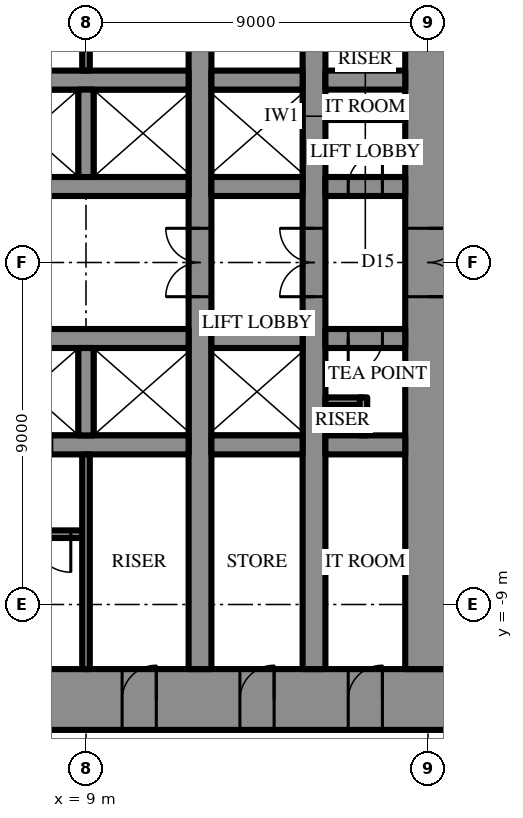
"""IFC4 building model, lengths in metres.
Left out: names, types, materials, properties, quantities, classifications, styles, units other than length and angle.
Written with IfcOpenShell. Run it as: python <this file> out.ifc"""

import sys

from ifc_helpers import new_model, si_unit, direction, frame, frame_2d, origin, place, context, subcontext, project, spatial, rectangle, extrude, element, fill, save


model = new_model("IFC4")
c1 = context("Model", 3, precision=1e-05, world=origin(), true_north=direction((0.0, 1.0)))
c2 = subcontext(c1, "Body", "Model", "MODEL_VIEW")
j1 = project(units=[si_unit("LENGTHUNIT", "METRE"), si_unit("PLANEANGLEUNIT", "RADIAN")], contexts=[c1])
p1 = place(None, origin())
s1 = spatial("IfcSite", under=j1, at=p1, CompositionType="ELEMENT")
p2 = place(p1, origin())
s2 = spatial("IfcBuilding", under=s1, at=p2, CompositionType="ELEMENT")
p3 = place(p2, frame((0.0, 0.0, 119.5)))
s3 = spatial("IfcBuildingStorey", under=s2, at=p3, CompositionType="ELEMENT", Elevation=119.5)
p4 = place(p3, frame((18.6, -11.5, 0.0), z_axis=(0.0, 0.0, 1.0), x_axis=(-1.0, 0.0, 0.0)))
e1 = element("IfcWall", 1, at=p4, inside=s3, PredefinedType="SHEAR", context=c2, shape_type="SweptSolid", body=[
    extrude(rectangle(XDim=37.2, YDim=1.6, at=frame_2d((18.6, 0.0))), origin(), (0.0, 0.0, 1.0), 4.2),
])
p5 = place(p4, frame((19.45, 0.0, 0.0)))
e2 = element("IfcOpeningElement", 2, at=p5, cuts=e1, PredefinedType="OPENING", context=c2, shape_type="SweptSolid", body=[
    extrude(rectangle(XDim=0.9, YDim=2.2, at=frame_2d((0.45, 1.1))), frame((0.0, 0.81, 0.0), z_axis=(0.0, -1.0, 0.0), x_axis=(1.0, 0.0, 0.0)), (0.0, 0.0, 1.0), 1.62),
])
p6 = place(p4, frame((22.45, 0.0, 0.0)))
e3 = element("IfcOpeningElement", 3, at=p6, cuts=e1, PredefinedType="OPENING", context=c2, shape_type="SweptSolid", body=[
    extrude(rectangle(XDim=0.9, YDim=2.2, at=frame_2d((0.45, 1.1))), frame((0.0, 0.81, 0.0), z_axis=(0.0, -1.0, 0.0), x_axis=(1.0, 0.0, 0.0)), (0.0, 0.0, 1.0), 1.62),
])
p7 = place(p4, frame((25.5, 0.0, 0.0)))
e4 = element("IfcOpeningElement", 4, at=p7, cuts=e1, PredefinedType="OPENING", context=c2, shape_type="SweptSolid", body=[
    extrude(rectangle(XDim=1.0, YDim=2.2, at=frame_2d((0.5, 1.1))), frame((0.0, 0.81, 0.0), z_axis=(0.0, -1.0, 0.0), x_axis=(1.0, 0.0, 0.0)), (0.0, 0.0, 1.0), 1.62),
])
p8 = place(p4, frame((1.8, 0.0, 0.0)))
e5 = element("IfcOpeningElement", 5, at=p8, cuts=e1, PredefinedType="OPENING", context=c2, shape_type="SweptSolid", body=[
    extrude(rectangle(XDim=0.9, YDim=2.2, at=frame_2d((0.45, 1.1))), frame((0.0, 0.81, 0.0), z_axis=(0.0, -1.0, 0.0), x_axis=(1.0, 0.0, 0.0)), (0.0, 0.0, 1.0), 1.62),
])
p9 = place(p4, frame((4.65, 0.0, 0.0)))
e6 = element("IfcOpeningElement", 6, at=p9, cuts=e1, PredefinedType="OPENING", context=c2, shape_type="SweptSolid", body=[
    extrude(rectangle(XDim=0.9, YDim=2.2, at=frame_2d((0.45, 1.1))), frame((0.0, 0.81, 0.0), z_axis=(0.0, -1.0, 0.0), x_axis=(1.0, 0.0, 0.0)), (0.0, 0.0, 1.0), 1.62),
])
p10 = place(p4, frame((7.75, 0.0, 0.0)))
e7 = element("IfcOpeningElement", 7, at=p10, cuts=e1, PredefinedType="OPENING", context=c2, shape_type="SweptSolid", body=[
    extrude(rectangle(XDim=0.9, YDim=2.2, at=frame_2d((0.45, 1.1))), frame((0.0, 0.81, 0.0), z_axis=(0.0, -1.0, 0.0), x_axis=(1.0, 0.0, 0.0)), (0.0, 0.0, 1.0), 1.62),
])
p11 = place(p4, frame((28.55, 0.0, 0.0)))
e8 = element("IfcOpeningElement", 8, at=p11, cuts=e1, PredefinedType="OPENING", context=c2, shape_type="SweptSolid", body=[
    extrude(rectangle(XDim=0.9, YDim=2.2, at=frame_2d((0.45, 1.1))), frame((0.0, 0.81, 0.0), z_axis=(0.0, -1.0, 0.0), x_axis=(1.0, 0.0, 0.0)), (0.0, 0.0, 1.0), 1.62),
])
p12 = place(p4, frame((31.65, 0.0, 0.0)))
e9 = element("IfcOpeningElement", 9, at=p12, cuts=e1, PredefinedType="OPENING", context=c2, shape_type="SweptSolid", body=[
    extrude(rectangle(XDim=0.9, YDim=2.2, at=frame_2d((0.45, 1.1))), frame((0.0, 0.81, 0.0), z_axis=(0.0, -1.0, 0.0), x_axis=(1.0, 0.0, 0.0)), (0.0, 0.0, 1.0), 1.62),
])
p13 = place(p4, frame((34.5, 0.0, 0.0)))
e10 = element("IfcOpeningElement", 10, at=p13, cuts=e1, PredefinedType="OPENING", context=c2, shape_type="SweptSolid", body=[
    extrude(rectangle(XDim=0.9, YDim=2.2, at=frame_2d((0.45, 1.1))), frame((0.0, 0.81, 0.0), z_axis=(0.0, -1.0, 0.0), x_axis=(1.0, 0.0, 0.0)), (0.0, 0.0, 1.0), 1.62),
])
p14 = place(p3, frame((18.0, -10.7, 0.0), z_axis=(0.0, 0.0, 1.0), x_axis=(0.0, 1.0, 0.0)))
e11 = element("IfcWall", 11, at=p14, inside=s3, PredefinedType="SHEAR", context=c2, shape_type="SweptSolid", body=[
    extrude(rectangle(XDim=21.4, YDim=1.2, at=frame_2d((10.7, 0.0))), origin(), (0.0, 0.0, 1.0), 4.2),
])
p15 = place(p14, frame((9.8, 0.0, 0.0)))
e12 = element("IfcOpeningElement", 12, at=p15, cuts=e11, PredefinedType="OPENING", context=c2, shape_type="SweptSolid", body=[
    extrude(rectangle(XDim=1.8, YDim=2.4, at=frame_2d((0.9, 1.2))), frame((0.0, 0.61, 0.0), z_axis=(0.0, -1.0, 0.0), x_axis=(1.0, 0.0, 0.0)), (0.0, 0.0, 1.0), 1.22),
])
p16 = place(p3, frame((12.0, -10.7, 0.0), z_axis=(0.0, 0.0, 1.0), x_axis=(0.0, 1.0, 0.0)))
e13 = element("IfcWall", 13, at=p16, inside=s3, PredefinedType="SHEAR", context=c2, shape_type="SweptSolid", body=[
    extrude(rectangle(XDim=21.4, YDim=0.6, at=frame_2d((10.7, 0.0))), origin(), (0.0, 0.0, 1.0), 4.2),
])
p17 = place(p16, frame((9.8, 0.0, 0.0)))
e14 = element("IfcOpeningElement", 14, at=p17, cuts=e13, PredefinedType="OPENING", context=c2, shape_type="SweptSolid", body=[
    extrude(rectangle(XDim=1.8, YDim=2.4, at=frame_2d((0.9, 1.2))), frame((0.0, 0.31, 0.0), z_axis=(0.0, -1.0, 0.0), x_axis=(1.0, 0.0, 0.0)), (0.0, 0.0, 1.0), 0.62),
])
p18 = place(p3, frame((15.0, -10.7, 0.0), z_axis=(0.0, 0.0, 1.0), x_axis=(0.0, 1.0, 0.0)))
e15 = element("IfcWall", 15, at=p18, inside=s3, PredefinedType="SHEAR", context=c2, shape_type="SweptSolid", body=[
    extrude(rectangle(XDim=21.4, YDim=0.6, at=frame_2d((10.7, 0.0))), origin(), (0.0, 0.0, 1.0), 4.2),
])
p19 = place(p18, frame((9.8, 0.0, 0.0)))
e16 = element("IfcOpeningElement", 16, at=p19, cuts=e15, PredefinedType="OPENING", context=c2, shape_type="SweptSolid", body=[
    extrude(rectangle(XDim=1.8, YDim=2.4, at=frame_2d((0.9, 1.2))), frame((0.0, 0.31, 0.0), z_axis=(0.0, -1.0, 0.0), x_axis=(1.0, 0.0, 0.0)), (0.0, 0.0, 1.0), 0.62),
])
p20 = place(p3, frame((-3.2, 2.0, 0.0), z_axis=(0.0, 0.0, 1.0), x_axis=(1.0, 0.0, 0.0)))
e17 = element("IfcWall", 17, at=p20, inside=s3, PredefinedType="SHEAR", context=c2, shape_type="SweptSolid", body=[
    extrude(rectangle(XDim=14.9, YDim=0.5, at=frame_2d((7.45, 0.0))), origin(), (0.0, 0.0, 1.0), 4.2),
])
p21 = place(p20, frame((1.15, 0.0, 0.0)))
e18 = element("IfcOpeningElement", 18, at=p21, cuts=e17, PredefinedType="OPENING", context=c2, shape_type="SweptSolid", body=[
    extrude(rectangle(XDim=1.1, YDim=2.2, at=frame_2d((0.55, 1.1))), frame((0.0, 0.26, 0.0), z_axis=(0.0, -1.0, 0.0), x_axis=(1.0, 0.0, 0.0)), (0.0, 0.0, 1.0), 0.52),
])
p22 = place(p20, frame((4.15, 0.0, 0.0)))
e19 = element("IfcOpeningElement", 19, at=p22, cuts=e17, PredefinedType="OPENING", context=c2, shape_type="SweptSolid", body=[
    extrude(rectangle(XDim=1.1, YDim=2.2, at=frame_2d((0.55, 1.1))), frame((0.0, 0.26, 0.0), z_axis=(0.0, -1.0, 0.0), x_axis=(1.0, 0.0, 0.0)), (0.0, 0.0, 1.0), 0.52),
])
p23 = place(p20, frame((7.15, 0.0, 0.0)))
e20 = element("IfcOpeningElement", 20, at=p23, cuts=e17, PredefinedType="OPENING", context=c2, shape_type="SweptSolid", body=[
    extrude(rectangle(XDim=1.1, YDim=2.2, at=frame_2d((0.55, 1.1))), frame((0.0, 0.26, 0.0), z_axis=(0.0, -1.0, 0.0), x_axis=(1.0, 0.0, 0.0)), (0.0, 0.0, 1.0), 0.52),
])
p24 = place(p20, frame((10.15, 0.0, 0.0)))
e21 = element("IfcOpeningElement", 21, at=p24, cuts=e17, PredefinedType="OPENING", context=c2, shape_type="SweptSolid", body=[
    extrude(rectangle(XDim=1.1, YDim=2.2, at=frame_2d((0.55, 1.1))), frame((0.0, 0.26, 0.0), z_axis=(0.0, -1.0, 0.0), x_axis=(1.0, 0.0, 0.0)), (0.0, 0.0, 1.0), 0.52),
])
p25 = place(p3, frame((12.3, 2.0, 0.0), z_axis=(0.0, 0.0, 1.0), x_axis=(1.0, 0.0, 0.0)))
e22 = element("IfcWall", 22, at=p25, inside=s3, PredefinedType="SHEAR", context=c2, shape_type="SweptSolid", body=[
    extrude(rectangle(XDim=2.4, YDim=0.5, at=frame_2d((1.2, 0.0))), origin(), (0.0, 0.0, 1.0), 4.2),
])
p26 = place(p3, frame((15.3, 2.0, 0.0), z_axis=(0.0, 0.0, 1.0), x_axis=(1.0, 0.0, 0.0)))
e23 = element("IfcWall", 23, at=p26, inside=s3, PredefinedType="SHEAR", context=c2, shape_type="SweptSolid", body=[
    extrude(rectangle(XDim=2.1, YDim=0.5, at=frame_2d((1.05, 0.0))), origin(), (0.0, 0.0, 1.0), 4.2),
])
p27 = place(p26, frame((0.6, 0.0, 0.0)))
e24 = element("IfcOpeningElement", 24, at=p27, cuts=e23, PredefinedType="OPENING", context=c2, shape_type="SweptSolid", body=[
    extrude(rectangle(XDim=0.9, YDim=2.2, at=frame_2d((0.45, 1.1))), frame((0.0, 0.26, 0.0), z_axis=(0.0, -1.0, 0.0), x_axis=(1.0, 0.0, 0.0)), (0.0, 0.0, 1.0), 0.52),
])
p28 = place(p3, frame((-11.7, 4.8, 0.0), z_axis=(0.0, 0.0, 1.0), x_axis=(1.0, 0.0, 0.0)))
e25 = element("IfcWall", 25, at=p28, inside=s3, PredefinedType="SHEAR", context=c2, shape_type="SweptSolid", body=[
    extrude(rectangle(XDim=23.4, YDim=0.5, at=frame_2d((11.7, 0.0))), origin(), (0.0, 0.0, 1.0), 4.2),
])
p29 = place(p28, frame((6.6, 0.0, 0.0)))
e26 = element("IfcOpeningElement", 26, at=p29, cuts=e25, PredefinedType="OPENING", context=c2, shape_type="SweptSolid", body=[
    extrude(rectangle(XDim=1.2, YDim=2.2, at=frame_2d((0.6, 1.1))), frame((0.0, 0.26, 0.0), z_axis=(0.0, -1.0, 0.0), x_axis=(1.0, 0.0, 0.0)), (0.0, 0.0, 1.0), 0.52),
])
p30 = place(p28, frame((3.6, 0.0, 0.0)))
e27 = element("IfcOpeningElement", 27, at=p30, cuts=e25, PredefinedType="OPENING", context=c2, shape_type="SweptSolid", body=[
    extrude(rectangle(XDim=1.2, YDim=2.2, at=frame_2d((0.6, 1.1))), frame((0.0, 0.26, 0.0), z_axis=(0.0, -1.0, 0.0), x_axis=(1.0, 0.0, 0.0)), (0.0, 0.0, 1.0), 0.52),
])
p31 = place(p3, frame((12.3, 4.8, 0.0), z_axis=(0.0, 0.0, 1.0), x_axis=(1.0, 0.0, 0.0)))
e28 = element("IfcWall", 28, at=p31, inside=s3, PredefinedType="SHEAR", context=c2, shape_type="SweptSolid", body=[
    extrude(rectangle(XDim=2.4, YDim=0.5, at=frame_2d((1.2, 0.0))), origin(), (0.0, 0.0, 1.0), 4.2),
])
p32 = place(p3, frame((15.3, 4.8, 0.0), z_axis=(0.0, 0.0, 1.0), x_axis=(1.0, 0.0, 0.0)))
e29 = element("IfcWall", 29, at=p32, inside=s3, PredefinedType="SHEAR", context=c2, shape_type="SweptSolid", body=[
    extrude(rectangle(XDim=2.1, YDim=0.5, at=frame_2d((1.05, 0.0))), origin(), (0.0, 0.0, 1.0), 4.2),
])
p33 = place(p3, frame((9.0, 2.25, 0.0), z_axis=(0.0, 0.0, 1.0), x_axis=(0.0, 1.0, 0.0)))
e30 = element("IfcWall", 30, at=p33, inside=s3, PredefinedType="SHEAR", context=c2, shape_type="SweptSolid", body=[
    extrude(rectangle(XDim=2.3, YDim=0.4, at=frame_2d((1.15, 0.0))), origin(), (0.0, 0.0, 1.0), 4.2),
])
p34 = place(p3, frame((17.4, -2.0, 0.0), z_axis=(0.0, 0.0, 1.0), x_axis=(-1.0, 0.0, 0.0)))
e31 = element("IfcWall", 31, at=p34, inside=s3, PredefinedType="SHEAR", context=c2, shape_type="SweptSolid", body=[
    extrude(rectangle(XDim=2.1, YDim=0.5, at=frame_2d((1.05, 0.0))), origin(), (0.0, 0.0, 1.0), 4.2),
])
p35 = place(p34, frame((0.6, 0.0, 0.0)))
e32 = element("IfcOpeningElement", 32, at=p35, cuts=e31, PredefinedType="OPENING", context=c2, shape_type="SweptSolid", body=[
    extrude(rectangle(XDim=0.9, YDim=2.2, at=frame_2d((0.45, 1.1))), frame((0.0, 0.26, 0.0), z_axis=(0.0, -1.0, 0.0), x_axis=(1.0, 0.0, 0.0)), (0.0, 0.0, 1.0), 0.52),
])
p36 = place(p3, frame((14.7, -2.0, 0.0), z_axis=(0.0, 0.0, 1.0), x_axis=(-1.0, 0.0, 0.0)))
e33 = element("IfcWall", 33, at=p36, inside=s3, PredefinedType="SHEAR", context=c2, shape_type="SweptSolid", body=[
    extrude(rectangle(XDim=2.4, YDim=0.5, at=frame_2d((1.2, 0.0))), origin(), (0.0, 0.0, 1.0), 4.2),
])
p37 = place(p3, frame((11.7, -2.0, 0.0), z_axis=(0.0, 0.0, 1.0), x_axis=(-1.0, 0.0, 0.0)))
e34 = element("IfcWall", 34, at=p37, inside=s3, PredefinedType="SHEAR", context=c2, shape_type="SweptSolid", body=[
    extrude(rectangle(XDim=5.9, YDim=0.5, at=frame_2d((2.95, 0.0))), origin(), (0.0, 0.0, 1.0), 4.2),
])
p38 = place(p3, frame((17.4, -4.8, 0.0), z_axis=(0.0, 0.0, 1.0), x_axis=(-1.0, 0.0, 0.0)))
e35 = element("IfcWall", 35, at=p38, inside=s3, PredefinedType="SHEAR", context=c2, shape_type="SweptSolid", body=[
    extrude(rectangle(XDim=2.1, YDim=0.5, at=frame_2d((1.05, 0.0))), origin(), (0.0, 0.0, 1.0), 4.2),
])
p39 = place(p3, frame((14.7, -4.8, 0.0), z_axis=(0.0, 0.0, 1.0), x_axis=(-1.0, 0.0, 0.0)))
e36 = element("IfcWall", 36, at=p39, inside=s3, PredefinedType="SHEAR", context=c2, shape_type="SweptSolid", body=[
    extrude(rectangle(XDim=2.4, YDim=0.5, at=frame_2d((1.2, 0.0))), origin(), (0.0, 0.0, 1.0), 4.2),
])
p40 = place(p3, frame((11.7, -4.8, 0.0), z_axis=(0.0, 0.0, 1.0), x_axis=(-1.0, 0.0, 0.0)))
e37 = element("IfcWall", 37, at=p40, inside=s3, PredefinedType="SHEAR", context=c2, shape_type="SweptSolid", body=[
    extrude(rectangle(XDim=23.4, YDim=0.5, at=frame_2d((11.7, 0.0))), origin(), (0.0, 0.0, 1.0), 4.2),
])
p41 = place(p40, frame((6.6, 0.0, 0.0)))
e38 = element("IfcOpeningElement", 38, at=p41, cuts=e37, PredefinedType="OPENING", context=c2, shape_type="SweptSolid", body=[
    extrude(rectangle(XDim=1.2, YDim=2.2, at=frame_2d((0.6, 1.1))), frame((0.0, 0.26, 0.0), z_axis=(0.0, -1.0, 0.0), x_axis=(1.0, 0.0, 0.0)), (0.0, 0.0, 1.0), 0.52),
])
p42 = place(p40, frame((3.6, 0.0, 0.0)))
e39 = element("IfcOpeningElement", 39, at=p42, cuts=e37, PredefinedType="OPENING", context=c2, shape_type="SweptSolid", body=[
    extrude(rectangle(XDim=1.2, YDim=2.2, at=frame_2d((0.6, 1.1))), frame((0.0, 0.26, 0.0), z_axis=(0.0, -1.0, 0.0), x_axis=(1.0, 0.0, 0.0)), (0.0, 0.0, 1.0), 0.52),
])
p43 = place(p3, frame((9.0, -2.25, 0.0), z_axis=(0.0, 0.0, 1.0), x_axis=(0.0, -1.0, 0.0)))
e40 = element("IfcWall", 40, at=p43, inside=s3, PredefinedType="SHEAR", context=c2, shape_type="SweptSolid", body=[
    extrude(rectangle(XDim=2.3, YDim=0.4, at=frame_2d((1.15, 0.0))), origin(), (0.0, 0.0, 1.0), 4.2),
])
p44 = place(p3, frame((8.9, -7.15, 0.0), z_axis=(0.0, 0.0, 1.0), x_axis=(-1.0, 0.0, 0.0)))
e41 = element("IfcWall", 41, at=p44, inside=s3, PredefinedType="SHEAR", context=c2, shape_type="SweptSolid", body=[
    extrude(rectangle(XDim=8.6, YDim=0.2, at=frame_2d((4.3, 0.0))), origin(), (0.0, 0.0, 1.0), 4.2),
])
p45 = place(p44, frame((0.3, 0.0, 0.0)))
e42 = element("IfcOpeningElement", 42, at=p45, cuts=e41, PredefinedType="OPENING", context=c2, shape_type="SweptSolid", body=[
    extrude(rectangle(XDim=1.0, YDim=2.2, at=frame_2d((0.5, 1.1))), frame((0.0, 0.11, 0.0), z_axis=(0.0, -1.0, 0.0), x_axis=(1.0, 0.0, 0.0)), (0.0, 0.0, 1.0), 0.22),
])
for number, where, z_axis, x_axis in (
    (43, (9.0, 5.05, 0.0), (0.0, 0.0, 1.0), (0.0, 1.0, 0.0)),
    (44, (9.0, -5.05, 0.0), (0.0, 0.0, 1.0), (0.0, -1.0, 0.0)),
):
    element("IfcWall", number, at=place(p3, frame(where, z_axis=z_axis, x_axis=x_axis)), inside=s3, PredefinedType="PARTITIONING", context=c2, shape_type="SweptSolid", body=[
        extrude(rectangle(XDim=5.65, YDim=0.2, at=frame_2d((2.825, 0.0))), origin(), (0.0, 0.0, 1.0), 4.0),
    ])
p46 = place(p3, frame((15.3, 3.85, 0.0), z_axis=(0.0, 0.0, 1.0), x_axis=(1.0, 0.0, 0.0)))
e45 = element("IfcWall", 45, at=p46, inside=s3, PredefinedType="PARTITIONING", context=c2, shape_type="SweptSolid", body=[
    extrude(rectangle(XDim=2.1, YDim=0.2, at=frame_2d((1.05, 0.0))), origin(), (0.0, 0.0, 1.0), 4.0),
])
for number, where, z_axis, x_axis in (
    (46, (16.3, -3.65, 0.0), (0.0, 0.0, 1.0), (-1.0, 0.0, 0.0)),
    (47, (16.3, -3.55, 0.0), (0.0, 0.0, 1.0), (0.0, -1.0, 0.0)),
):
    element("IfcWall", number, at=place(p3, frame(where, z_axis=z_axis, x_axis=x_axis)), inside=s3, PredefinedType="PARTITIONING", context=c2, shape_type="SweptSolid", body=[
        extrude(rectangle(XDim=1.0, YDim=0.2, at=frame_2d((0.5, 0.0))), origin(), (0.0, 0.0, 1.0), 4.0),
    ])
p47 = place(p15, frame((1.8, 0.0, 0.0), z_axis=(0.0, 0.0, 1.0), x_axis=(-1.0, 0.0, 0.0)))
e48 = element("IfcDoor", 48, at=p47, inside=s3, OperationType="DOUBLE_DOOR_SINGLE_SWING", PredefinedType="DOOR", context=c2, shape_type="SweptSolid", body=[
    extrude(rectangle(XDim=1.8, YDim=2.4, at=frame_2d((0.9, 1.2))), frame((0.0, 0.025, 0.0), z_axis=(0.0, -1.0, 0.0), x_axis=(1.0, 0.0, 0.0)), (0.0, 0.0, 1.0), 0.05),
])
fill(e12, e48)
p48 = place(p45, origin())
e49 = element("IfcDoor", 49, at=p48, inside=s3, OperationType="SINGLE_SWING_RIGHT", PredefinedType="DOOR", context=c2, shape_type="SweptSolid", body=[
    extrude(rectangle(XDim=1.0, YDim=2.2, at=frame_2d((0.5, 1.1))), frame((0.0, 0.025, 0.0), z_axis=(0.0, -1.0, 0.0), x_axis=(1.0, 0.0, 0.0)), (0.0, 0.0, 1.0), 0.05),
])
fill(e42, e49)
p49 = place(p8, frame((0.9, 0.0, 0.0), z_axis=(0.0, 0.0, 1.0), x_axis=(-1.0, 0.0, 0.0)))
e50 = element("IfcDoor", 50, at=p49, inside=s3, OperationType="SINGLE_SWING_LEFT", PredefinedType="DOOR", context=c2, shape_type="SweptSolid", body=[
    extrude(rectangle(XDim=0.9, YDim=2.2, at=frame_2d((0.45, 1.1))), frame((0.0, 0.025, 0.0), z_axis=(0.0, -1.0, 0.0), x_axis=(1.0, 0.0, 0.0)), (0.0, 0.0, 1.0), 0.05),
])
fill(e5, e50)
p50 = place(p9, frame((0.9, 0.0, 0.0), z_axis=(0.0, 0.0, 1.0), x_axis=(-1.0, 0.0, 0.0)))
e51 = element("IfcDoor", 51, at=p50, inside=s3, OperationType="SINGLE_SWING_LEFT", PredefinedType="DOOR", context=c2, shape_type="SweptSolid", body=[
    extrude(rectangle(XDim=0.9, YDim=2.2, at=frame_2d((0.45, 1.1))), frame((0.0, 0.025, 0.0), z_axis=(0.0, -1.0, 0.0), x_axis=(1.0, 0.0, 0.0)), (0.0, 0.0, 1.0), 0.05),
])
fill(e6, e51)
p51 = place(p10, frame((0.9, 0.0, 0.0), z_axis=(0.0, 0.0, 1.0), x_axis=(-1.0, 0.0, 0.0)))
e52 = element("IfcDoor", 52, at=p51, inside=s3, OperationType="SINGLE_SWING_LEFT", PredefinedType="DOOR", context=c2, shape_type="SweptSolid", body=[
    extrude(rectangle(XDim=0.9, YDim=2.2, at=frame_2d((0.45, 1.1))), frame((0.0, 0.025, 0.0), z_axis=(0.0, -1.0, 0.0), x_axis=(1.0, 0.0, 0.0)), (0.0, 0.0, 1.0), 0.05),
])
fill(e7, e52)
p52 = place(p27, origin())
e53 = element("IfcDoor", 53, at=p52, inside=s3, OperationType="SINGLE_SWING_LEFT", PredefinedType="DOOR", context=c2, shape_type="SweptSolid", body=[
    extrude(rectangle(XDim=0.9, YDim=2.2, at=frame_2d((0.45, 1.1))), frame((0.0, 0.025, 0.0), z_axis=(0.0, -1.0, 0.0), x_axis=(1.0, 0.0, 0.0)), (0.0, 0.0, 1.0), 0.05),
])
fill(e24, e53)
p53 = place(p35, origin())
e54 = element("IfcDoor", 54, at=p53, inside=s3, OperationType="SINGLE_SWING_LEFT", PredefinedType="DOOR", context=c2, shape_type="SweptSolid", body=[
    extrude(rectangle(XDim=0.9, YDim=2.2, at=frame_2d((0.45, 1.1))), frame((0.0, 0.025, 0.0), z_axis=(0.0, -1.0, 0.0), x_axis=(1.0, 0.0, 0.0)), (0.0, 0.0, 1.0), 0.05),
])
fill(e32, e54)
p54 = place(p17, origin())
e55 = element("IfcDoor", 55, at=p54, inside=s3, OperationType="DOUBLE_DOOR_SINGLE_SWING", PredefinedType="DOOR", context=c2, shape_type="SweptSolid", body=[
    extrude(rectangle(XDim=1.8, YDim=2.4, at=frame_2d((0.9, 1.2))), frame((0.0, 0.025, 0.0), z_axis=(0.0, -1.0, 0.0), x_axis=(1.0, 0.0, 0.0)), (0.0, 0.0, 1.0), 0.05),
])
fill(e14, e55)
p55 = place(p19, origin())
e56 = element("IfcDoor", 56, at=p55, inside=s3, OperationType="DOUBLE_DOOR_SINGLE_SWING", PredefinedType="DOOR", context=c2, shape_type="SweptSolid", body=[
    extrude(rectangle(XDim=1.8, YDim=2.4, at=frame_2d((0.9, 1.2))), frame((0.0, 0.025, 0.0), z_axis=(0.0, -1.0, 0.0), x_axis=(1.0, 0.0, 0.0)), (0.0, 0.0, 1.0), 0.05),
])
fill(e16, e56)
save(model, sys.argv[1])
